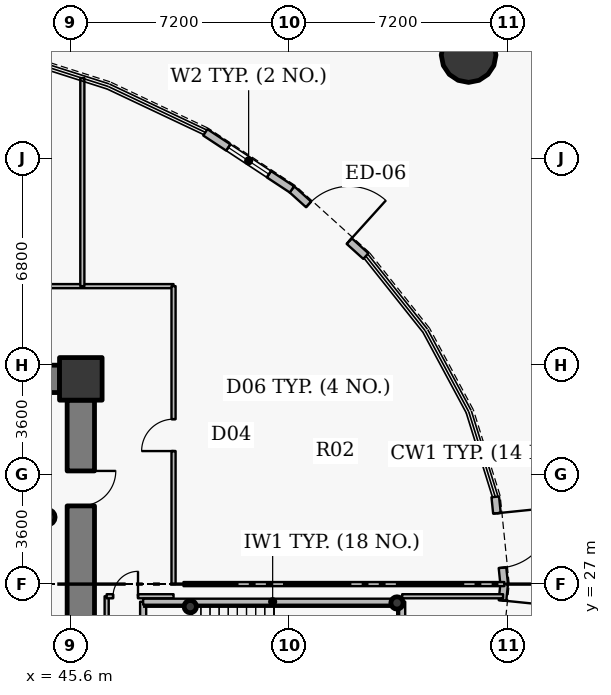
"""IFC4 building model, lengths in metres.
Left out: names, types, materials, properties, quantities, classifications, styles, units other than length and angle.
Written with IfcOpenShell. Run it as: python <this file> out.ifc"""

import sys

from ifc_helpers import new_model, si_unit, direction, frame, frame_2d, origin, origin_2d, place, context, subcontext, project, spatial, rectangle, hollow_circle, extrude, source, transform, mapped, element, fill, save


model = new_model("IFC4")
c1 = context("Model", 3, precision=1e-05, world=origin(), true_north=direction((0.0, 1.0)))
c2 = subcontext(c1, "Body", "Model", "MODEL_VIEW")
j1 = project(units=[si_unit("LENGTHUNIT", "METRE"), si_unit("PLANEANGLEUNIT", "RADIAN")], contexts=[c1])
p1 = place(None, origin())
s1 = spatial("IfcSite", under=j1, at=p1, CompositionType="ELEMENT")
p2 = place(p1, origin())
s2 = spatial("IfcBuilding", under=s1, at=p2, CompositionType="ELEMENT")
p3 = place(p2, origin())
s3 = spatial("IfcBuildingStorey", under=s2, at=p3, CompositionType="ELEMENT", Elevation=0.0)
p4 = place(p3, frame((45.95, 33.75, 0.0), z_axis=(0.0, 0.0, 1.0), x_axis=(1.0, 0.0, 0.0)))
e1 = element("IfcColumn", 1, at=p4, inside=s3, PredefinedType="COLUMN", context=c2, shape_type="SweptSolid", body=[
    extrude(rectangle(XDim=1.4, YDim=1.4, at=origin_2d()), origin(), (0.0, 0.0, 1.0), 6.0),
])
for number, where, z_axis, x_axis in (
    (2, (56.35, 26.38, 0.0), (0.0, 0.0, 1.0), (1.0, 0.0, 0.0)),
    (3, (49.55, 26.26, 0.0), (0.0, 0.0, 1.0), (1.0, 0.0, 0.0)),
):
    element("IfcColumn", number, at=place(p3, frame(where, z_axis=z_axis, x_axis=x_axis)), inside=s3, PredefinedType="COLUMN", context=c2, shape_type="SweptSolid", body=[
        extrude(hollow_circle(Radius=0.203, WallThickness=0.016, at=origin_2d()), origin(), (0.0, 0.0, 1.0), 6.0),
    ])
p5 = place(p3, frame((26.75, 33.75, 0.0), z_axis=(0.0, 0.0, 1.0), x_axis=(1.0, 0.0, 0.0)))
e4 = element("IfcWall", 4, at=p5, inside=s3, PredefinedType="SHEAR", context=c2, shape_type="SweptSolid", body=[
    extrude(rectangle(XDim=18.5, YDim=0.9, at=frame_2d((9.25, 0.0))), origin(), (0.0, 0.0, 1.0), 5.15),
])
p6 = place(p3, frame((45.95, 33.05, 0.0), z_axis=(0.0, 0.0, 1.0), x_axis=(0.0, -1.0, 0.0)))
e5 = element("IfcWall", 5, at=p6, inside=s3, PredefinedType="SHEAR", context=c2, shape_type="SweptSolid", body=[
    extrude(rectangle(XDim=12.1, YDim=0.9, at=frame_2d((6.05, 0.0))), origin(), (0.0, 0.0, 1.0), 5.15),
])
p7 = place(p6, frame((2.328, 0.0, 0.0)))
e6 = element("IfcOpeningElement", 6, at=p7, cuts=e5, PredefinedType="OPENING", context=c2, shape_type="SweptSolid", body=[
    extrude(rectangle(XDim=1.15, YDim=2.15, at=origin_2d()), frame((0.575, 0.46, 1.075), z_axis=(0.0, -1.0, 0.0), x_axis=(1.0, 0.0, 0.0)), (0.0, 0.0, 1.0), 0.92),
])
p8 = place(p3, frame((58.705, 44.401, 0.0), z_axis=(0.0, 0.0, 1.0), x_axis=(1.0, 0.0, 0.0)))
e7 = element("IfcColumn", 7, at=p8, inside=s3, PredefinedType="COLUMN", context=c2, shape_type="SweptSolid", body=[
    extrude(hollow_circle(Radius=0.9, WallThickness=0.05, at=origin_2d()), origin(), (0.0, 0.0, 1.0), 6.0),
])
p9 = place(p3, frame((44.85, 29.2, 0.0), z_axis=(0.0, 0.0, 1.0), x_axis=(1.0, 0.0, 0.0)))
e8 = element("IfcColumn", 8, at=p9, inside=s3, PredefinedType="COLUMN", context=c2, shape_type="SweptSolid", body=[
    extrude(hollow_circle(Radius=0.254, WallThickness=0.02, at=origin_2d()), origin(), (0.0, 0.0, 1.0), 6.0),
])
p10 = place(p3, frame((59.582, 29.869, 0.0), z_axis=(0.0, 0.0, 1.0), x_axis=(0.10159063445, -0.994826287847, 0.0)))
e9 = element("IfcWall", 9, at=p10, inside=s3, PredefinedType="SOLIDWALL", context=c2, shape_type="SweptSolid", body=[
    extrude(rectangle(XDim=2.884, YDim=0.25, at=frame_2d((1.442, 0.0))), origin(), (0.0, 0.0, 1.0), 4.885),
])
p11 = place(p10, frame((0.542, 0.0, 0.0)))
e10 = element("IfcOpeningElement", 10, at=p11, cuts=e9, PredefinedType="OPENING", context=c2, shape_type="SweptSolid", body=[
    extrude(rectangle(XDim=1.8, YDim=2.2, at=origin_2d()), frame((0.9, 0.135, 1.1), z_axis=(0.0, -1.0, 0.0), x_axis=(1.0, 0.0, 0.0)), (0.0, 0.0, 1.0), 0.27),
])
p12 = place(p3, frame((52.894, 39.982, 0.0), z_axis=(0.0, 0.0, 1.0), x_axis=(0.742374125199, -0.669985565692, 0.0)))
e11 = element("IfcWall", 11, at=p12, inside=s3, PredefinedType="SOLIDWALL", context=c2, shape_type="SweptSolid", body=[
    extrude(rectangle(XDim=3.275, YDim=0.25, at=frame_2d((1.637, 0.0))), origin(), (0.0, 0.0, 1.0), 4.885),
])
p13 = place(p12, frame((0.738, 0.0, 0.0)))
e12 = element("IfcOpeningElement", 12, at=p13, cuts=e11, PredefinedType="OPENING", context=c2, shape_type="SweptSolid", body=[
    extrude(rectangle(XDim=1.8, YDim=2.2, at=origin_2d()), frame((0.9, 0.135, 1.1), z_axis=(0.0, -1.0, 0.0), x_axis=(1.0, 0.0, 0.0)), (0.0, 0.0, 1.0), 0.27),
])
p14 = place(p3, frame((50.046, 41.858, 0.0), z_axis=(0.0, 0.0, 1.0), x_axis=(0.835263082911, -0.549850509071, 0.0)))
e13 = element("IfcWall", 13, at=p14, inside=s3, PredefinedType="SOLIDWALL", context=c2, shape_type="SweptSolid", body=[
    extrude(rectangle(XDim=3.41, YDim=0.25, at=frame_2d((1.705, 0.0))), origin(), (0.0, 0.0, 1.0), 4.885),
])
p15 = place(p14, frame((0.905, 0.0, 0.9)))
e14 = element("IfcOpeningElement", 14, at=p15, cuts=e13, PredefinedType="OPENING", context=c2, shape_type="SweptSolid", body=[
    extrude(rectangle(XDim=1.6, YDim=1.75, at=origin_2d()), frame((0.8, 0.135, 0.875), z_axis=(0.0, -1.0, 0.0), x_axis=(1.0, 0.0, 0.0)), (0.0, 0.0, 1.0), 0.27),
])
p16 = place(p3, frame((59.875, 27.0, 0.0), z_axis=(0.0, 0.0, 1.0), x_axis=(-0.10159063445, -0.994826287847, 0.0)))
e15 = element("IfcWall", 15, at=p16, inside=s3, PredefinedType="SOLIDWALL", context=c2, shape_type="SweptSolid", body=[
    extrude(rectangle(XDim=2.884, YDim=0.25, at=frame_2d((1.442, 0.0))), origin(), (0.0, 0.0, 1.0), 4.885),
])
p17 = place(p16, frame((0.542, 0.0, 0.0)))
e16 = element("IfcOpeningElement", 16, at=p17, cuts=e15, PredefinedType="OPENING", context=c2, shape_type="SweptSolid", body=[
    extrude(rectangle(XDim=1.8, YDim=2.2, at=origin_2d()), frame((0.9, 0.135, 1.1), z_axis=(0.0, -1.0, 0.0), x_axis=(1.0, 0.0, 0.0)), (0.0, 0.0, 1.0), 0.27),
])
p18 = place(p3, frame((37.8, 36.8, 0.0), z_axis=(0.0, 0.0, 1.0), x_axis=(1.0, 0.0, 0.0)))
e17 = element("IfcWall", 17, at=p18, inside=s3, PredefinedType="PARTITIONING", context=c2, shape_type="SweptSolid", body=[
    extrude(rectangle(XDim=11.2, YDim=0.135, at=frame_2d((5.6, 0.0))), origin(), (0.0, 0.0, 1.0), 4.885),
])
p19 = place(p3, frame((46.0, 36.8, 0.0), z_axis=(0.0, 0.0, 1.0), x_axis=(0.0, 1.0, 0.0)))
e18 = element("IfcWall", 18, at=p19, inside=s3, PredefinedType="PARTITIONING", context=c2, shape_type="SweptSolid", body=[
    extrude(rectangle(XDim=6.844, YDim=0.135, at=frame_2d((3.422, 0.0))), origin(), (0.0, 0.0, 1.0), 4.885),
])
p20 = place(p3, frame((46.8, 22.8, 0.0), z_axis=(0.0, 0.0, 1.0), x_axis=(0.0, 1.0, 0.0)))
e19 = element("IfcWall", 19, at=p20, inside=s3, PredefinedType="PARTITIONING", context=c2, shape_type="SweptSolid", body=[
    extrude(rectangle(XDim=3.8, YDim=0.135, at=frame_2d((1.9, 0.0))), origin(), (0.0, 0.0, 1.0), 4.885),
])
p21 = place(p3, frame((46.8, 26.6, 0.0), z_axis=(0.0, 0.0, 1.0), x_axis=(1.0, 0.0, 0.0)))
e20 = element("IfcWall", 20, at=p21, inside=s3, PredefinedType="PARTITIONING", context=c2, shape_type="SweptSolid", body=[
    extrude(rectangle(XDim=2.2, YDim=0.135, at=frame_2d((1.1, 0.0))), origin(), (0.0, 0.0, 1.0), 5.7),
])
p22 = place(p21, frame((0.211, 0.0, 0.0)))
e21 = element("IfcOpeningElement", 21, at=p22, cuts=e20, PredefinedType="OPENING", context=c2, shape_type="SweptSolid", body=[
    extrude(rectangle(XDim=0.82, YDim=2.1, at=origin_2d()), frame((0.41, 0.078, 1.05), z_axis=(0.0, -1.0, 0.0), x_axis=(1.0, 0.0, 0.0)), (0.0, 0.0, 1.0), 0.155),
])
p23 = place(p3, frame((48.0, 22.88, 0.0), z_axis=(0.0, 0.0, 1.0), x_axis=(0.0, 1.0, 0.0)))
e22 = element("IfcWall", 22, at=p23, inside=s3, PredefinedType="PARTITIONING", context=c2, shape_type="SweptSolid", body=[
    extrude(rectangle(XDim=3.54, YDim=0.2, at=frame_2d((1.77, 0.0))), origin(), (0.0, 0.0, 1.0), 5.7),
])
p24 = place(p3, frame((48.0, 26.42, 0.0), z_axis=(0.0, 0.0, 1.0), x_axis=(1.0, 0.0, 0.0)))
e23 = element("IfcWall", 23, at=p24, inside=s3, PredefinedType="PARTITIONING", context=c2, shape_type="SweptSolid", body=[
    extrude(rectangle(XDim=8.52, YDim=0.2, at=frame_2d((4.26, 0.0))), origin(), (0.0, 0.0, 1.0), 5.7),
])
p25 = place(p3, frame((49.0, 27.0, 0.0), z_axis=(0.0, 0.0, 1.0), x_axis=(0.0, 1.0, 0.0)))
e24 = element("IfcWall", 24, at=p25, inside=s3, PredefinedType="PARTITIONING", context=c2, shape_type="SweptSolid", body=[
    extrude(rectangle(XDim=9.8, YDim=0.135, at=frame_2d((4.9, 0.0))), origin(), (0.0, 0.0, 1.0), 4.885),
])
p26 = place(p25, frame((4.375, 0.0, 0.0)))
e25 = element("IfcOpeningElement", 25, at=p26, cuts=e24, PredefinedType="OPENING", context=c2, shape_type="SweptSolid", body=[
    extrude(rectangle(XDim=1.05, YDim=2.15, at=origin_2d()), frame((0.525, 0.078, 1.075), z_axis=(0.0, -1.0, 0.0), x_axis=(1.0, 0.0, 0.0)), (0.0, 0.0, 1.0), 0.155),
])
p27 = place(p3, frame((56.52, 22.88, 0.0), z_axis=(0.0, 0.0, 1.0), x_axis=(0.0, 1.0, 0.0)))
e26 = element("IfcWall", 26, at=p27, inside=s3, PredefinedType="PARTITIONING", context=c2, shape_type="SweptSolid", body=[
    extrude(rectangle(XDim=3.54, YDim=0.2, at=frame_2d((1.77, 0.0))), origin(), (0.0, 0.0, 1.0), 5.7),
])
p28 = place(p3, frame((56.52, 26.6, 0.0), z_axis=(0.0, 0.0, 1.0), x_axis=(1.0, 0.0, 0.0)))
e27 = element("IfcWall", 27, at=p28, inside=s3, PredefinedType="PARTITIONING", context=c2, shape_type="SweptSolid", body=[
    extrude(rectangle(XDim=3.319, YDim=0.135, at=frame_2d((1.66, 0.0))), origin(), (0.0, 0.0, 1.0), 5.7),
])
p29 = place(p3, frame((46.4, 34.2, 0.0), z_axis=(0.0, 0.0, 1.0), x_axis=(-1.0, 0.0, 0.0)))
e28 = element("IfcWall", 28, at=p29, inside=s3, PredefinedType="PARTITIONING", context=c2, shape_type="SweptSolid", body=[
    extrude(rectangle(XDim=1.14, YDim=0.135, at=frame_2d((0.57, 0.0))), origin(), (0.0, 0.0, 1.0), 4.885),
])
p30 = place(p3, frame((46.4, 33.06, 0.0), z_axis=(0.0, 0.0, 1.0), x_axis=(0.0, 1.0, 0.0)))
e29 = element("IfcWall", 29, at=p30, inside=s3, PredefinedType="PARTITIONING", context=c2, shape_type="SweptSolid", body=[
    extrude(rectangle(XDim=0.833, YDim=0.135, at=frame_2d((0.416, 0.0))), origin(), (0.0, 0.0, 1.0), 5.7),
])
p31 = place(p3, frame((59.88, 27.0, 0.0), z_axis=(0.0, 0.0, 1.0), x_axis=(-1.0, 0.0, 0.0)))
e30 = element("IfcWall", 30, at=p31, inside=s3, PredefinedType="PARTITIONING", context=c2, shape_type="SweptSolid", body=[
    extrude(rectangle(XDim=10.552, YDim=0.135, at=frame_2d((5.276, 0.0))), origin(), (0.0, 0.0, 1.0), 4.885),
])
m1 = source(origin(), c2, "Body", "SweptSolid", [
    extrude(rectangle(XDim=1.8, YDim=2.2, at=origin_2d()), frame((0.9, 0.025, 1.1), z_axis=(0.0, -1.0, 0.0), x_axis=(1.0, 0.0, 0.0)), (0.0, 0.0, 1.0), 0.05),
])
p32 = place(p11, origin())
e31 = element("IfcDoor", 31, at=p32, inside=s3, OperationType="SINGLE_SWING_LEFT", PredefinedType="DOOR", context=c2, shape_type="MappedRepresentation", body=[
    mapped(m1, transform((0.0, 0.0, 0.0), x_axis=(1.0, 0.0, 0.0), y_axis=(0.0, 1.0, 0.0), z_axis=(0.0, 0.0, 1.0), scale=1.0)),
])
fill(e10, e31)
p33 = place(p13, origin())
e32 = element("IfcDoor", 32, at=p33, inside=s3, OperationType="SINGLE_SWING_RIGHT", PredefinedType="DOOR", context=c2, shape_type="MappedRepresentation", body=[
    mapped(m1, transform((0.0, 0.0, 0.0), x_axis=(1.0, 0.0, 0.0), y_axis=(0.0, 1.0, 0.0), z_axis=(0.0, 0.0, 1.0), scale=1.0)),
])
fill(e12, e32)
m2 = source(origin(), c2, "Body", "SweptSolid", [
    extrude(rectangle(XDim=1.6, YDim=1.75, at=origin_2d()), frame((0.8, 0.03, 0.875), z_axis=(0.0, -1.0, 0.0), x_axis=(1.0, 0.0, 0.0)), (0.0, 0.0, 1.0), 0.06),
])
p34 = place(p15, origin())
e33 = element("IfcWindow", 33, at=p34, inside=s3, PartitioningType="DOUBLE_PANEL_VERTICAL", PredefinedType="WINDOW", context=c2, shape_type="MappedRepresentation", body=[
    mapped(m2, transform((0.0, 0.0, 0.0), x_axis=(1.0, 0.0, 0.0), y_axis=(0.0, 1.0, 0.0), z_axis=(0.0, 0.0, 1.0), scale=1.0)),
])
fill(e14, e33)
p35 = place(p17, origin())
e34 = element("IfcDoor", 34, at=p35, inside=s3, OperationType="SINGLE_SWING_LEFT", PredefinedType="DOOR", context=c2, shape_type="MappedRepresentation", body=[
    mapped(m1, transform((0.0, 0.0, 0.0), x_axis=(1.0, 0.0, 0.0), y_axis=(0.0, 1.0, 0.0), z_axis=(0.0, 0.0, 1.0), scale=1.0)),
])
fill(e16, e34)
m3 = source(origin(), c2, "Body", "SweptSolid", [
    extrude(rectangle(XDim=1.15, YDim=2.15, at=origin_2d()), frame((0.575, 0.025, 1.075), z_axis=(0.0, -1.0, 0.0), x_axis=(1.0, 0.0, 0.0)), (0.0, 0.0, 1.0), 0.05),
])
p36 = place(p7, origin())
e35 = element("IfcDoor", 35, at=p36, inside=s3, OperationType="SINGLE_SWING_LEFT", PredefinedType="DOOR", context=c2, shape_type="MappedRepresentation", body=[
    mapped(m3, transform((0.0, 0.0, 0.0), x_axis=(1.0, 0.0, 0.0), y_axis=(0.0, 1.0, 0.0), z_axis=(0.0, 0.0, 1.0), scale=1.0)),
])
fill(e6, e35)
m4 = source(origin(), c2, "Body", "SweptSolid", [
    extrude(rectangle(XDim=0.82, YDim=2.1, at=origin_2d()), frame((0.41, 0.025, 1.05), z_axis=(0.0, -1.0, 0.0), x_axis=(1.0, 0.0, 0.0)), (0.0, 0.0, 1.0), 0.05),
])
p37 = place(p22, origin())
e36 = element("IfcDoor", 36, at=p37, inside=s3, OperationType="SINGLE_SWING_RIGHT", PredefinedType="DOOR", context=c2, shape_type="MappedRepresentation", body=[
    mapped(m4, transform((0.0, 0.0, 0.0), x_axis=(1.0, 0.0, 0.0), y_axis=(0.0, 1.0, 0.0), z_axis=(0.0, 0.0, 1.0), scale=1.0)),
])
fill(e21, e36)
m5 = source(origin(), c2, "Body", "SweptSolid", [
    extrude(rectangle(XDim=1.05, YDim=2.15, at=origin_2d()), frame((0.525, 0.025, 1.075), z_axis=(0.0, -1.0, 0.0), x_axis=(1.0, 0.0, 0.0)), (0.0, 0.0, 1.0), 0.05),
])
p38 = place(p26, origin())
e37 = element("IfcDoor", 37, at=p38, inside=s3, OperationType="SINGLE_SWING_LEFT", PredefinedType="DOOR", context=c2, shape_type="MappedRepresentation", body=[
    mapped(m5, transform((0.0, 0.0, 0.0), x_axis=(1.0, 0.0, 0.0), y_axis=(0.0, 1.0, 0.0), z_axis=(0.0, 0.0, 1.0), scale=1.0)),
])
fill(e25, e37)
save(model, sys.argv[1])
